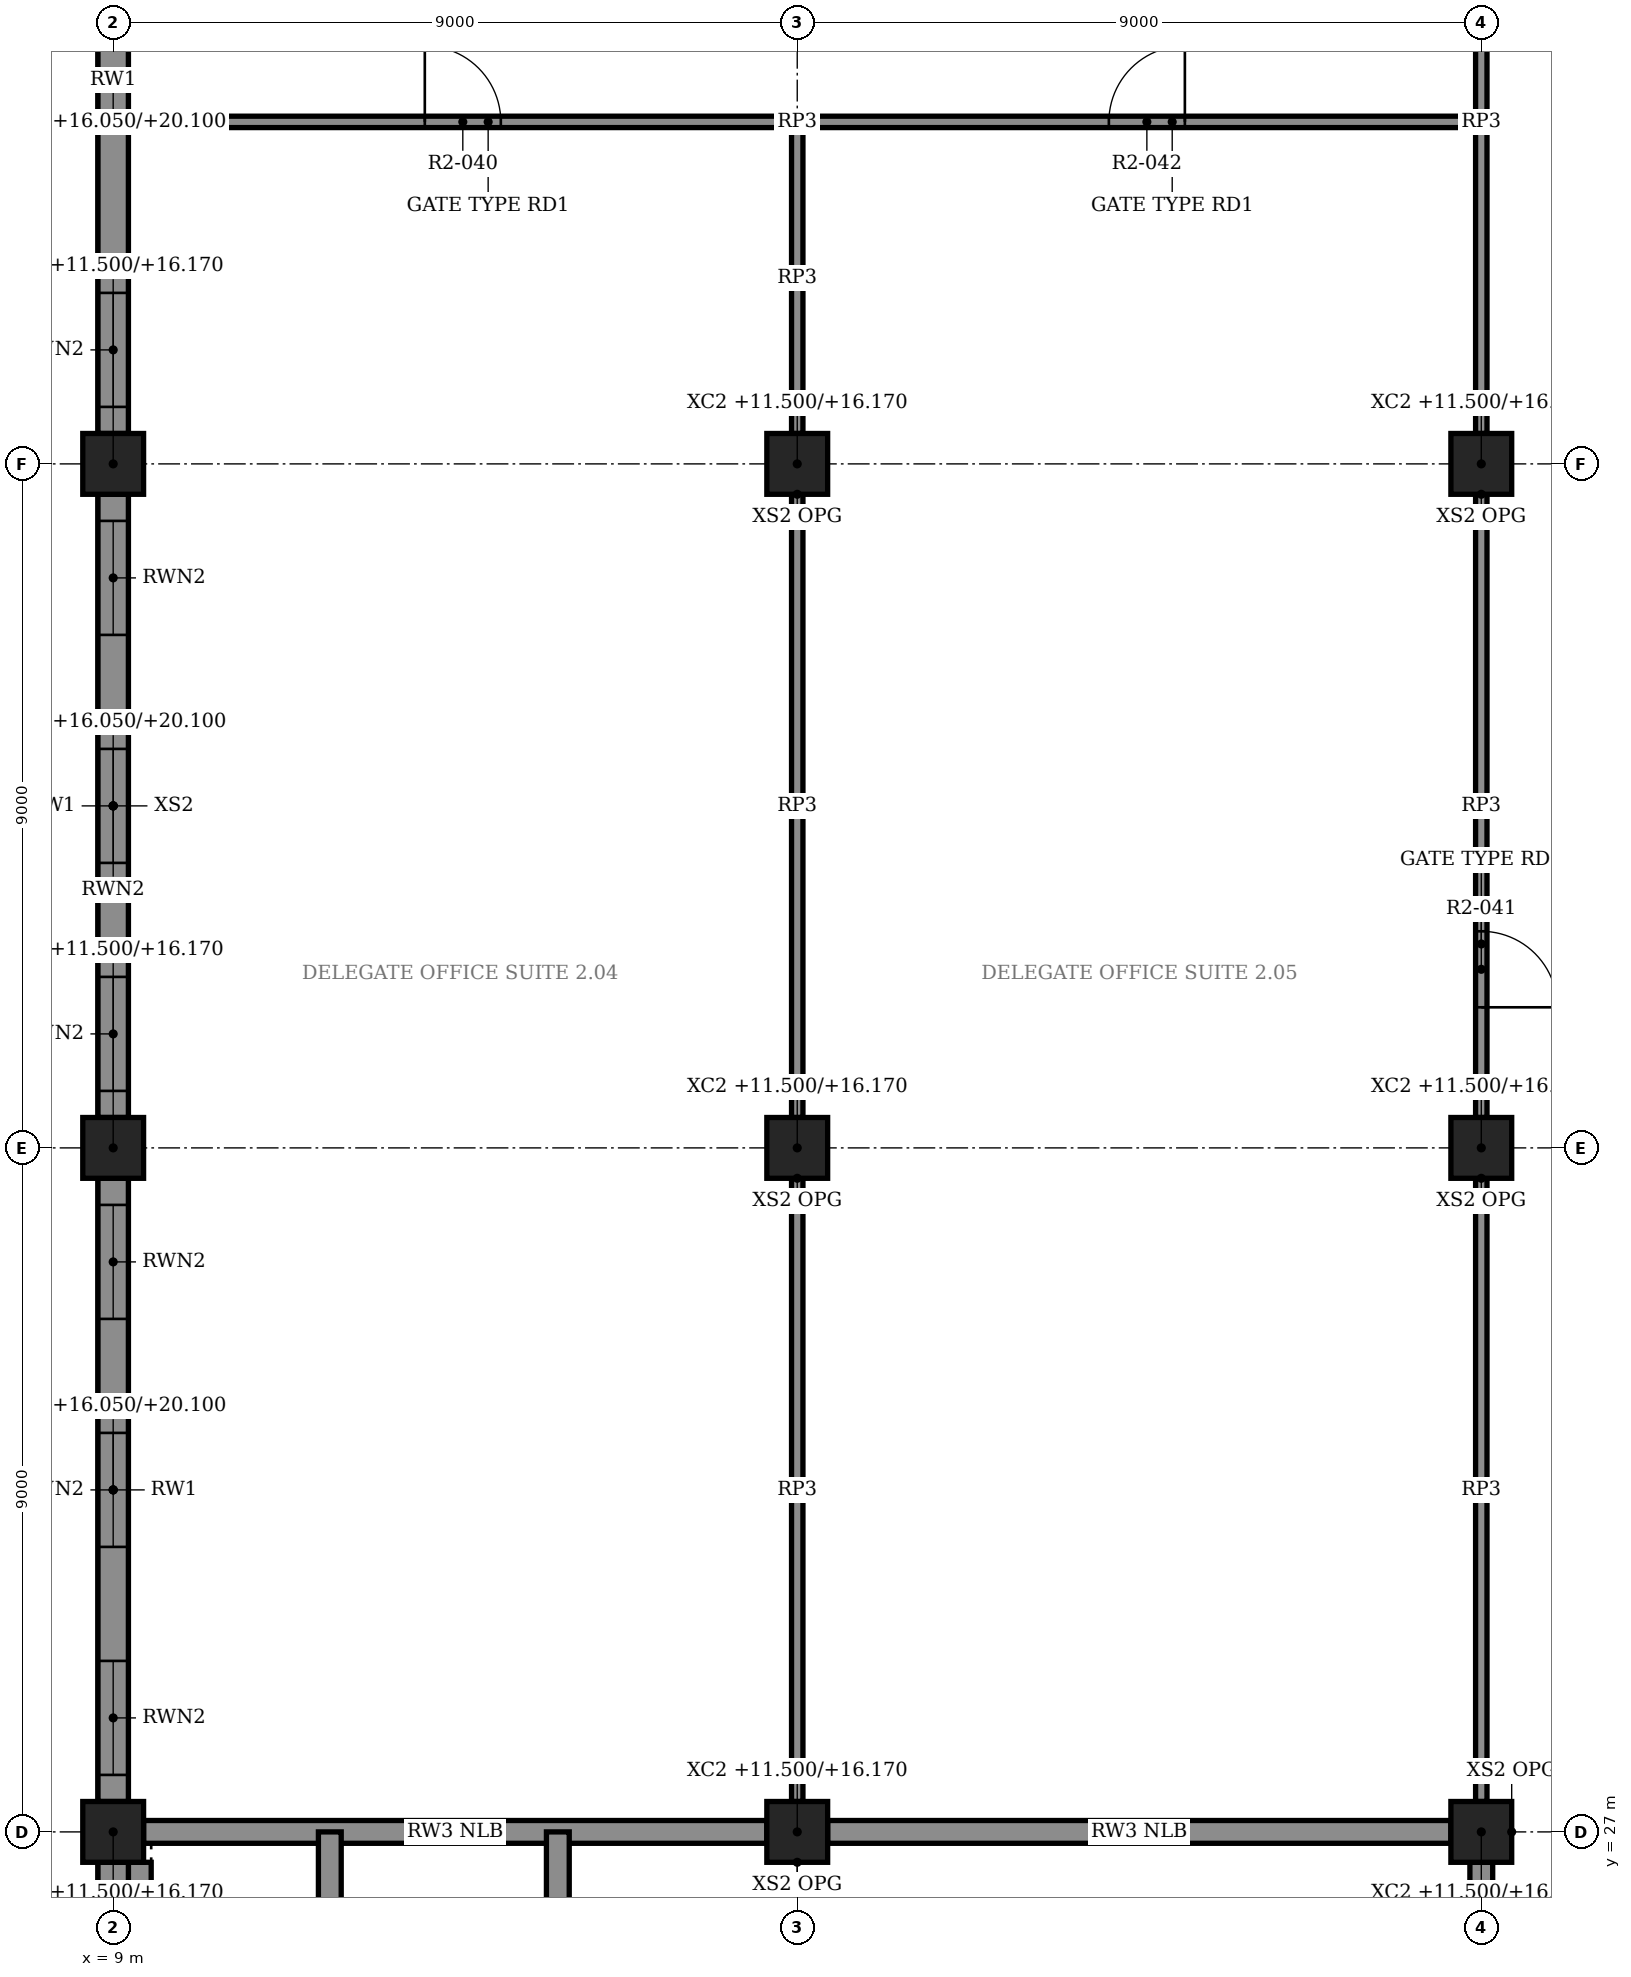
"""IFC4 building model, lengths in metres.
Left out: names, types, materials, properties, quantities, classifications, styles, units other than length and angle.
Written with IfcOpenShell. Run it as: python <this file> out.ifc"""

import sys

from ifc_helpers import new_model, si_unit, direction, frame, frame_2d, origin, origin_2d, place, context, subcontext, project, spatial, rectangle, extrude, element, fill, save


model = new_model("IFC4")
c1 = context("Model", 3, precision=1e-05, world=origin(), true_north=direction((0.0, 1.0)))
c2 = subcontext(c1, "Body", "Model", "MODEL_VIEW")
j1 = project(units=[si_unit("LENGTHUNIT", "METRE"), si_unit("PLANEANGLEUNIT", "RADIAN")], contexts=[c1])
p1 = place(None, origin())
s1 = spatial("IfcSite", under=j1, at=p1, CompositionType="ELEMENT")
p2 = place(p1, origin())
s2 = spatial("IfcBuilding", under=s1, at=p2, CompositionType="ELEMENT")
p3 = place(p2, frame((0.0, 0.0, 11.5)))
s3 = spatial("IfcBuildingStorey", under=s2, at=p3, CompositionType="ELEMENT", Elevation=11.5)
for number, where, z_axis, x_axis in (
    (1, (9.0, 27.0, 0.0), (0.0, 0.0, 1.0), (1.0, 0.0, 0.0)),
    (2, (9.0, 36.0, 0.0), (0.0, 0.0, 1.0), (1.0, 0.0, 0.0)),
    (3, (9.0, 45.0, 0.0), (0.0, 0.0, 1.0), (1.0, 0.0, 0.0)),
    (4, (18.0, 27.0, 0.0), (0.0, 0.0, 1.0), (1.0, 0.0, 0.0)),
    (5, (18.0, 36.0, 0.0), (0.0, 0.0, 1.0), (1.0, 0.0, 0.0)),
    (6, (18.0, 45.0, 0.0), (0.0, 0.0, 1.0), (1.0, 0.0, 0.0)),
    (7, (27.0, 27.0, 0.0), (0.0, 0.0, 1.0), (1.0, 0.0, 0.0)),
    (8, (27.0, 36.0, 0.0), (0.0, 0.0, 1.0), (1.0, 0.0, 0.0)),
    (9, (27.0, 45.0, 0.0), (0.0, 0.0, 1.0), (1.0, 0.0, 0.0)),
):
    element("IfcColumn", number, at=place(p3, frame(where, z_axis=z_axis, x_axis=x_axis)), inside=s3, PredefinedType="COLUMN", context=c2, shape_type="SweptSolid", body=[
        extrude(rectangle(XDim=0.8, YDim=0.8, at=origin_2d()), origin(), (0.0, 0.0, 1.0), 4.67),
    ])
for number, where, z_axis, x_axis in (
    (10, (9.0, 18.0, 4.55), (0.0, 0.0, 1.0), (0.0, 1.0, 0.0)),
    (11, (9.0, 27.0, 4.55), (0.0, 0.0, 1.0), (0.0, 1.0, 0.0)),
    (12, (9.0, 36.0, 4.55), (0.0, 0.0, 1.0), (0.0, 1.0, 0.0)),
    (13, (9.0, 45.0, 4.55), (0.0, 0.0, 1.0), (0.0, 1.0, 0.0)),
):
    element("IfcWall", number, at=place(p3, frame(where, z_axis=z_axis, x_axis=x_axis)), inside=s3, PredefinedType="SOLIDWALL", context=c2, shape_type="SweptSolid", body=[
        extrude(rectangle(XDim=9.0, YDim=0.4, at=frame_2d((4.5, 0.0))), origin(), (0.0, 0.0, 1.0), 4.05),
    ])
p4 = place(p3, frame((9.0, 18.4, 0.0), z_axis=(0.0, 0.0, 1.0), x_axis=(0.0, 1.0, 0.0)))
e14 = element("IfcWall", 14, at=p4, inside=s3, PredefinedType="SOLIDWALL", context=c2, shape_type="SweptSolid", body=[
    extrude(rectangle(XDim=8.2, YDim=0.4, at=frame_2d((4.1, 0.0))), origin(), (0.0, 0.0, 1.0), 4.55),
])
p5 = place(p4, frame((1.55, 0.0, 1.2)))
e15 = element("IfcOpeningElement", 15, at=p5, cuts=e14, PredefinedType="OPENING", context=c2, shape_type="SweptSolid", body=[
    extrude(rectangle(XDim=1.5, YDim=1.8, at=frame_2d((0.75, 0.9))), frame((0.0, 0.21, 0.0), z_axis=(0.0, -1.0, 0.0), x_axis=(1.0, 0.0, 0.0)), (0.0, 0.0, 1.0), 0.42),
])
p6 = place(p3, frame((9.0, 27.4, 0.0), z_axis=(0.0, 0.0, 1.0), x_axis=(0.0, 1.0, 0.0)))
e16 = element("IfcWall", 16, at=p6, inside=s3, PredefinedType="SOLIDWALL", context=c2, shape_type="SweptSolid", body=[
    extrude(rectangle(XDim=8.2, YDim=0.4, at=frame_2d((4.1, 0.0))), origin(), (0.0, 0.0, 1.0), 4.55),
])
p7 = place(p6, frame((0.35, 0.0, 0.9)))
e17 = element("IfcOpeningElement", 17, at=p7, cuts=e16, PredefinedType="OPENING", context=c2, shape_type="SweptSolid", body=[
    extrude(rectangle(XDim=1.5, YDim=2.4, at=frame_2d((0.75, 1.2))), frame((0.0, 0.21, 0.0), z_axis=(0.0, -1.0, 0.0), x_axis=(1.0, 0.0, 0.0)), (0.0, 0.0, 1.0), 0.42),
])
p8 = place(p6, frame((3.35, 0.0, 0.9)))
e18 = element("IfcOpeningElement", 18, at=p8, cuts=e16, PredefinedType="OPENING", context=c2, shape_type="SweptSolid", body=[
    extrude(rectangle(XDim=1.5, YDim=2.4, at=frame_2d((0.75, 1.2))), frame((0.0, 0.21, 0.0), z_axis=(0.0, -1.0, 0.0), x_axis=(1.0, 0.0, 0.0)), (0.0, 0.0, 1.0), 0.42),
])
p9 = place(p6, frame((6.35, 0.0, 0.9)))
e19 = element("IfcOpeningElement", 19, at=p9, cuts=e16, PredefinedType="OPENING", context=c2, shape_type="SweptSolid", body=[
    extrude(rectangle(XDim=1.5, YDim=2.4, at=frame_2d((0.75, 1.2))), frame((0.0, 0.21, 0.0), z_axis=(0.0, -1.0, 0.0), x_axis=(1.0, 0.0, 0.0)), (0.0, 0.0, 1.0), 0.42),
])
p10 = place(p3, frame((9.0, 36.4, 0.0), z_axis=(0.0, 0.0, 1.0), x_axis=(0.0, 1.0, 0.0)))
e20 = element("IfcWall", 20, at=p10, inside=s3, PredefinedType="SOLIDWALL", context=c2, shape_type="SweptSolid", body=[
    extrude(rectangle(XDim=8.2, YDim=0.4, at=frame_2d((4.1, 0.0))), origin(), (0.0, 0.0, 1.0), 4.55),
])
p11 = place(p10, frame((0.35, 0.0, 0.9)))
e21 = element("IfcOpeningElement", 21, at=p11, cuts=e20, PredefinedType="OPENING", context=c2, shape_type="SweptSolid", body=[
    extrude(rectangle(XDim=1.5, YDim=2.4, at=frame_2d((0.75, 1.2))), frame((0.0, 0.21, 0.0), z_axis=(0.0, -1.0, 0.0), x_axis=(1.0, 0.0, 0.0)), (0.0, 0.0, 1.0), 0.42),
])
p12 = place(p10, frame((3.35, 0.0, 0.9)))
e22 = element("IfcOpeningElement", 22, at=p12, cuts=e20, PredefinedType="OPENING", context=c2, shape_type="SweptSolid", body=[
    extrude(rectangle(XDim=1.5, YDim=2.4, at=frame_2d((0.75, 1.2))), frame((0.0, 0.21, 0.0), z_axis=(0.0, -1.0, 0.0), x_axis=(1.0, 0.0, 0.0)), (0.0, 0.0, 1.0), 0.42),
])
p13 = place(p10, frame((6.35, 0.0, 0.9)))
e23 = element("IfcOpeningElement", 23, at=p13, cuts=e20, PredefinedType="OPENING", context=c2, shape_type="SweptSolid", body=[
    extrude(rectangle(XDim=1.5, YDim=2.4, at=frame_2d((0.75, 1.2))), frame((0.0, 0.21, 0.0), z_axis=(0.0, -1.0, 0.0), x_axis=(1.0, 0.0, 0.0)), (0.0, 0.0, 1.0), 0.42),
])
p14 = place(p3, frame((9.0, 45.4, 0.0), z_axis=(0.0, 0.0, 1.0), x_axis=(0.0, 1.0, 0.0)))
e24 = element("IfcWall", 24, at=p14, inside=s3, PredefinedType="SOLIDWALL", context=c2, shape_type="SweptSolid", body=[
    extrude(rectangle(XDim=8.2, YDim=0.4, at=frame_2d((4.1, 0.0))), origin(), (0.0, 0.0, 1.0), 4.55),
])
p15 = place(p14, frame((0.35, 0.0, 0.9)))
e25 = element("IfcOpeningElement", 25, at=p15, cuts=e24, PredefinedType="OPENING", context=c2, shape_type="SweptSolid", body=[
    extrude(rectangle(XDim=1.5, YDim=2.4, at=frame_2d((0.75, 1.2))), frame((0.0, 0.21, 0.0), z_axis=(0.0, -1.0, 0.0), x_axis=(1.0, 0.0, 0.0)), (0.0, 0.0, 1.0), 0.42),
])
p16 = place(p14, frame((6.35, 0.0, 0.9)))
e26 = element("IfcOpeningElement", 26, at=p16, cuts=e24, PredefinedType="OPENING", context=c2, shape_type="SweptSolid", body=[
    extrude(rectangle(XDim=1.5, YDim=2.4, at=frame_2d((0.75, 1.2))), frame((0.0, 0.21, 0.0), z_axis=(0.0, -1.0, 0.0), x_axis=(1.0, 0.0, 0.0)), (0.0, 0.0, 1.0), 0.42),
])
for number, where, z_axis, x_axis in (
    (27, (9.4, 27.0, 0.0), (0.0, 0.0, 1.0), (1.0, 0.0, 0.0)),
    (28, (18.4, 27.0, 0.0), (0.0, 0.0, 1.0), (1.0, 0.0, 0.0)),
):
    element("IfcWall", number, at=place(p3, frame(where, z_axis=z_axis, x_axis=x_axis)), inside=s3, PredefinedType="SOLIDWALL", context=c2, shape_type="SweptSolid", body=[
        extrude(rectangle(XDim=8.2, YDim=0.3, at=frame_2d((4.1, 0.0))), origin(), (0.0, 0.0, 1.0), 4.3),
    ])
p17 = place(p3, frame((27.0, 18.4, 0.0), z_axis=(0.0, 0.0, 1.0), x_axis=(0.0, 1.0, 0.0)))
e29 = element("IfcWall", 29, at=p17, inside=s3, PredefinedType="SOLIDWALL", context=c2, shape_type="SweptSolid", body=[
    extrude(rectangle(XDim=8.2, YDim=0.3, at=frame_2d((4.1, 0.0))), origin(), (0.0, 0.0, 1.0), 4.3),
])
p18 = place(p17, frame((2.65, 0.0, 0.0)))
e30 = element("IfcOpeningElement", 30, at=p18, cuts=e29, PredefinedType="OPENING", context=c2, shape_type="SweptSolid", body=[
    extrude(rectangle(XDim=1.8, YDim=2.4, at=frame_2d((0.9, 1.2))), frame((0.0, 0.16, 0.0), z_axis=(0.0, -1.0, 0.0), x_axis=(1.0, 0.0, 0.0)), (0.0, 0.0, 1.0), 0.32),
])
for number, where, z_axis, x_axis in (
    (31, (11.85, 23.1, 0.0), (0.0, 0.0, 1.0), (0.0, 1.0, 0.0)),
    (32, (14.85, 23.1, 0.0), (0.0, 0.0, 1.0), (0.0, 1.0, 0.0)),
):
    element("IfcWall", number, at=place(p3, frame(where, z_axis=z_axis, x_axis=x_axis)), inside=s3, PredefinedType="SOLIDWALL", context=c2, shape_type="SweptSolid", body=[
        extrude(rectangle(XDim=3.9, YDim=0.3, at=frame_2d((1.95, 0.0))), origin(), (0.0, 0.0, 1.0), 4.3),
    ])
p19 = place(p3, frame((9.35, 23.1, 0.0), z_axis=(0.0, 0.0, 1.0), x_axis=(0.0, 1.0, 0.0)))
e33 = element("IfcWall", 33, at=p19, inside=s3, PredefinedType="SOLIDWALL", context=c2, shape_type="SweptSolid", body=[
    extrude(rectangle(XDim=3.5, YDim=0.3, at=frame_2d((1.75, 0.0))), origin(), (0.0, 0.0, 1.0), 4.3),
])
p20 = place(p3, frame((9.0, 49.5, 0.0), z_axis=(0.0, 0.0, 1.0), x_axis=(1.0, 0.0, 0.0)))
e34 = element("IfcWall", 34, at=p20, inside=s3, PredefinedType="PARTITIONING", context=c2, shape_type="SweptSolid", body=[
    extrude(rectangle(XDim=18.0, YDim=0.15, at=frame_2d((9.0, 0.0))), origin(), (0.0, 0.0, 1.0), 4.55),
])
p21 = place(p20, frame((4.1, 0.0, 0.0)))
e35 = element("IfcOpeningElement", 35, at=p21, cuts=e34, PredefinedType="OPENING", context=c2, shape_type="SweptSolid", body=[
    extrude(rectangle(XDim=1.0, YDim=2.4, at=frame_2d((0.5, 1.2))), frame((0.0, 0.085, 0.0), z_axis=(0.0, -1.0, 0.0), x_axis=(1.0, 0.0, 0.0)), (0.0, 0.0, 1.0), 0.17),
])
p22 = place(p20, frame((13.1, 0.0, 0.0)))
e36 = element("IfcOpeningElement", 36, at=p22, cuts=e34, PredefinedType="OPENING", context=c2, shape_type="SweptSolid", body=[
    extrude(rectangle(XDim=1.0, YDim=2.4, at=frame_2d((0.5, 1.2))), frame((0.0, 0.085, 0.0), z_axis=(0.0, -1.0, 0.0), x_axis=(1.0, 0.0, 0.0)), (0.0, 0.0, 1.0), 0.17),
])
for number, where, z_axis, x_axis in (
    (37, (18.0, 27.4, 0.0), (0.0, 0.0, 1.0), (0.0, 1.0, 0.0)),
    (38, (18.0, 36.4, 0.0), (0.0, 0.0, 1.0), (0.0, 1.0, 0.0)),
):
    element("IfcWall", number, at=place(p3, frame(where, z_axis=z_axis, x_axis=x_axis)), inside=s3, PredefinedType="PARTITIONING", context=c2, shape_type="SweptSolid", body=[
        extrude(rectangle(XDim=8.2, YDim=0.15, at=frame_2d((4.1, 0.0))), origin(), (0.0, 0.0, 1.0), 4.55),
    ])
p23 = place(p3, frame((18.0, 45.4, 0.0), z_axis=(0.0, 0.0, 1.0), x_axis=(0.0, 1.0, 0.0)))
e39 = element("IfcWall", 39, at=p23, inside=s3, PredefinedType="PARTITIONING", context=c2, shape_type="SweptSolid", body=[
    extrude(rectangle(XDim=4.1, YDim=0.15, at=frame_2d((2.05, 0.0))), origin(), (0.0, 0.0, 1.0), 4.55),
])
p24 = place(p3, frame((27.0, 27.4, 0.0), z_axis=(0.0, 0.0, 1.0), x_axis=(0.0, 1.0, 0.0)))
e40 = element("IfcWall", 40, at=p24, inside=s3, PredefinedType="PARTITIONING", context=c2, shape_type="SweptSolid", body=[
    extrude(rectangle(XDim=8.2, YDim=0.15, at=frame_2d((4.1, 0.0))), origin(), (0.0, 0.0, 1.0), 4.55),
])
p25 = place(p3, frame((27.0, 36.4, 0.0), z_axis=(0.0, 0.0, 1.0), x_axis=(0.0, 1.0, 0.0)))
e41 = element("IfcWall", 41, at=p25, inside=s3, PredefinedType="PARTITIONING", context=c2, shape_type="SweptSolid", body=[
    extrude(rectangle(XDim=8.2, YDim=0.15, at=frame_2d((4.1, 0.0))), origin(), (0.0, 0.0, 1.0), 4.55),
])
p26 = place(p25, frame((1.45, 0.0, 0.0)))
e42 = element("IfcOpeningElement", 42, at=p26, cuts=e41, PredefinedType="OPENING", context=c2, shape_type="SweptSolid", body=[
    extrude(rectangle(XDim=1.0, YDim=2.4, at=frame_2d((0.5, 1.2))), frame((0.0, 0.085, 0.0), z_axis=(0.0, -1.0, 0.0), x_axis=(1.0, 0.0, 0.0)), (0.0, 0.0, 1.0), 0.17),
])
p27 = place(p3, frame((27.0, 45.4, 0.0), z_axis=(0.0, 0.0, 1.0), x_axis=(0.0, 1.0, 0.0)))
e43 = element("IfcWall", 43, at=p27, inside=s3, PredefinedType="PARTITIONING", context=c2, shape_type="SweptSolid", body=[
    extrude(rectangle(XDim=8.2, YDim=0.15, at=frame_2d((4.1, 0.0))), origin(), (0.0, 0.0, 1.0), 4.55),
])
p28 = place(p7, origin())
e44 = element("IfcWindow", 44, at=p28, inside=s3, PartitioningType="SINGLE_PANEL", PredefinedType="WINDOW", context=c2, shape_type="SweptSolid", body=[
    extrude(rectangle(XDim=1.5, YDim=2.4, at=frame_2d((0.75, 1.2))), frame((0.0, 0.03, 0.0), z_axis=(0.0, -1.0, 0.0), x_axis=(1.0, 0.0, 0.0)), (0.0, 0.0, 1.0), 0.06),
])
fill(e17, e44)
p29 = place(p8, origin())
e45 = element("IfcWindow", 45, at=p29, inside=s3, PartitioningType="SINGLE_PANEL", PredefinedType="WINDOW", context=c2, shape_type="SweptSolid", body=[
    extrude(rectangle(XDim=1.5, YDim=2.4, at=frame_2d((0.75, 1.2))), frame((0.0, 0.03, 0.0), z_axis=(0.0, -1.0, 0.0), x_axis=(1.0, 0.0, 0.0)), (0.0, 0.0, 1.0), 0.06),
])
fill(e18, e45)
p30 = place(p9, origin())
e46 = element("IfcWindow", 46, at=p30, inside=s3, PartitioningType="SINGLE_PANEL", PredefinedType="WINDOW", context=c2, shape_type="SweptSolid", body=[
    extrude(rectangle(XDim=1.5, YDim=2.4, at=frame_2d((0.75, 1.2))), frame((0.0, 0.03, 0.0), z_axis=(0.0, -1.0, 0.0), x_axis=(1.0, 0.0, 0.0)), (0.0, 0.0, 1.0), 0.06),
])
fill(e19, e46)
p31 = place(p11, origin())
e47 = element("IfcWindow", 47, at=p31, inside=s3, PartitioningType="SINGLE_PANEL", PredefinedType="WINDOW", context=c2, shape_type="SweptSolid", body=[
    extrude(rectangle(XDim=1.5, YDim=2.4, at=frame_2d((0.75, 1.2))), frame((0.0, 0.03, 0.0), z_axis=(0.0, -1.0, 0.0), x_axis=(1.0, 0.0, 0.0)), (0.0, 0.0, 1.0), 0.06),
])
fill(e21, e47)
p32 = place(p12, origin())
e48 = element("IfcWindow", 48, at=p32, inside=s3, PartitioningType="SINGLE_PANEL", PredefinedType="WINDOW", context=c2, shape_type="SweptSolid", body=[
    extrude(rectangle(XDim=1.5, YDim=2.4, at=frame_2d((0.75, 1.2))), frame((0.0, 0.03, 0.0), z_axis=(0.0, -1.0, 0.0), x_axis=(1.0, 0.0, 0.0)), (0.0, 0.0, 1.0), 0.06),
])
fill(e22, e48)
p33 = place(p13, origin())
e49 = element("IfcWindow", 49, at=p33, inside=s3, PartitioningType="SINGLE_PANEL", PredefinedType="WINDOW", context=c2, shape_type="SweptSolid", body=[
    extrude(rectangle(XDim=1.5, YDim=2.4, at=frame_2d((0.75, 1.2))), frame((0.0, 0.03, 0.0), z_axis=(0.0, -1.0, 0.0), x_axis=(1.0, 0.0, 0.0)), (0.0, 0.0, 1.0), 0.06),
])
fill(e23, e49)
p34 = place(p15, origin())
e50 = element("IfcWindow", 50, at=p34, inside=s3, PartitioningType="SINGLE_PANEL", PredefinedType="WINDOW", context=c2, shape_type="SweptSolid", body=[
    extrude(rectangle(XDim=1.5, YDim=2.4, at=frame_2d((0.75, 1.2))), frame((0.0, 0.03, 0.0), z_axis=(0.0, -1.0, 0.0), x_axis=(1.0, 0.0, 0.0)), (0.0, 0.0, 1.0), 0.06),
])
fill(e25, e50)
p35 = place(p21, origin())
e51 = element("IfcDoor", 51, at=p35, inside=s3, OperationType="SINGLE_SWING_LEFT", PredefinedType="DOOR", context=c2, shape_type="SweptSolid", body=[
    extrude(rectangle(XDim=1.0, YDim=2.4, at=frame_2d((0.5, 1.2))), frame((0.0, 0.025, 0.0), z_axis=(0.0, -1.0, 0.0), x_axis=(1.0, 0.0, 0.0)), (0.0, 0.0, 1.0), 0.05),
])
fill(e35, e51)
p36 = place(p26, frame((1.0, 0.0, 0.0), z_axis=(0.0, 0.0, 1.0), x_axis=(-1.0, 0.0, 0.0)))
e52 = element("IfcDoor", 52, at=p36, inside=s3, OperationType="SINGLE_SWING_LEFT", PredefinedType="DOOR", context=c2, shape_type="SweptSolid", body=[
    extrude(rectangle(XDim=1.0, YDim=2.4, at=frame_2d((0.5, 1.2))), frame((0.0, 0.025, 0.0), z_axis=(0.0, -1.0, 0.0), x_axis=(1.0, 0.0, 0.0)), (0.0, 0.0, 1.0), 0.05),
])
fill(e42, e52)
p37 = place(p22, origin())
e53 = element("IfcDoor", 53, at=p37, inside=s3, OperationType="SINGLE_SWING_LEFT", PredefinedType="DOOR", context=c2, shape_type="SweptSolid", body=[
    extrude(rectangle(XDim=1.0, YDim=2.4, at=frame_2d((0.5, 1.2))), frame((0.0, 0.025, 0.0), z_axis=(0.0, -1.0, 0.0), x_axis=(1.0, 0.0, 0.0)), (0.0, 0.0, 1.0), 0.05),
])
fill(e36, e53)
save(model, sys.argv[1])
